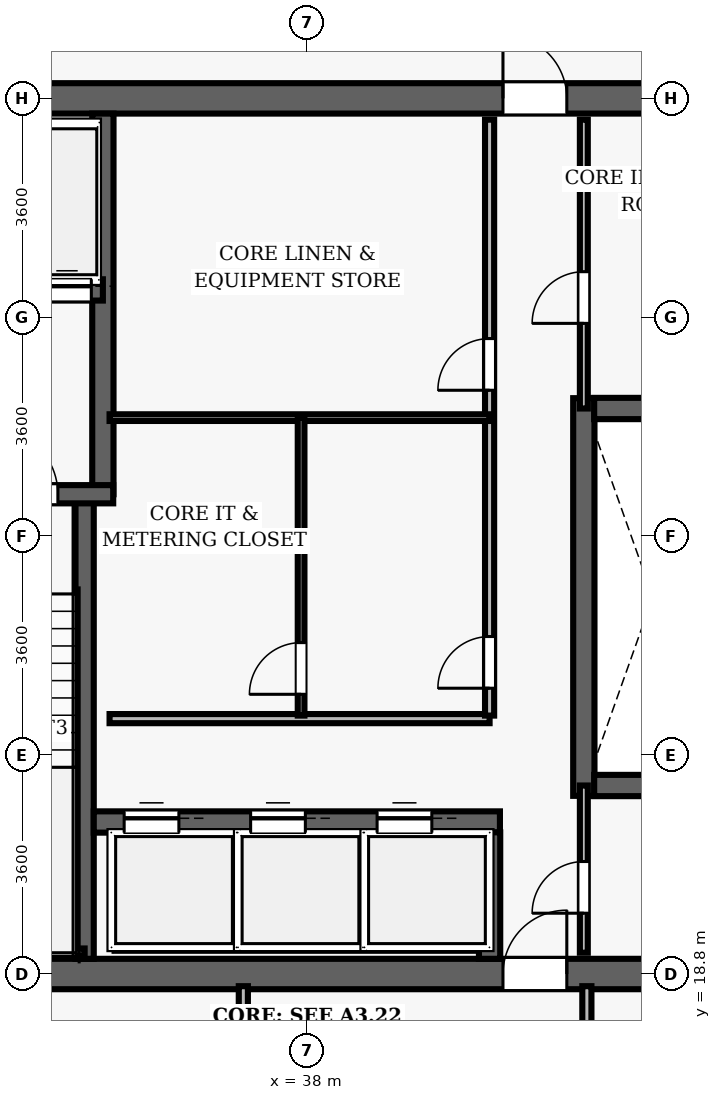
"""IFC4 building model, lengths in metres.
Left out: names, types, materials, properties, quantities, classifications, styles, units other than length and angle.
Written with IfcOpenShell. Run it as: python <this file> out.ifc"""

import sys

from ifc_helpers import new_model, si_unit, direction, frame, frame_2d, origin, place, context, subcontext, project, spatial, rectangle, extrude, element, fill, save


model = new_model("IFC4")
c1 = context("Model", 3, precision=1e-05, world=origin(), true_north=direction((0.0, 1.0)))
c2 = subcontext(c1, "Body", "Model", "MODEL_VIEW")
j1 = project(units=[si_unit("LENGTHUNIT", "METRE"), si_unit("PLANEANGLEUNIT", "RADIAN")], contexts=[c1])
p1 = place(None, origin())
s1 = spatial("IfcSite", under=j1, at=p1, CompositionType="ELEMENT")
p2 = place(p1, origin())
s2 = spatial("IfcBuilding", under=s1, at=p2, CompositionType="ELEMENT")
p3 = place(p2, frame((0.0, 0.0, 194.3)))
s3 = spatial("IfcBuildingStorey", under=s2, at=p3, CompositionType="ELEMENT", Elevation=194.3)
p4 = place(p3, frame((26.75, 18.8, 0.0), z_axis=(0.0, 0.0, 1.0), x_axis=(1.0, 0.0, 0.0)))
e1 = element("IfcWall", 1, at=p4, inside=s3, PredefinedType="SHEAR", context=c2, shape_type="SweptSolid", body=[
    extrude(rectangle(XDim=22.5, YDim=0.5, at=frame_2d((11.25, 0.0))), origin(), (0.0, 0.0, 1.0), 3.85),
])
p5 = place(p4, frame((14.47, 0.0, 0.0)))
e2 = element("IfcOpeningElement", 2, at=p5, cuts=e1, PredefinedType="OPENING", context=c2, shape_type="SweptSolid", body=[
    extrude(rectangle(XDim=1.05, YDim=2.15, at=frame_2d((0.525, 1.075))), frame((0.0, 0.26, 0.0), z_axis=(0.0, -1.0, 0.0), x_axis=(1.0, 0.0, 0.0)), (0.0, 0.0, 1.0), 0.52),
])
p6 = place(p3, frame((26.75, 33.2, 0.0), z_axis=(0.0, 0.0, 1.0), x_axis=(1.0, 0.0, 0.0)))
e3 = element("IfcWall", 3, at=p6, inside=s3, PredefinedType="SHEAR", context=c2, shape_type="SweptSolid", body=[
    extrude(rectangle(XDim=22.5, YDim=0.5, at=frame_2d((11.25, 0.0))), origin(), (0.0, 0.0, 1.0), 3.85),
])
p7 = place(p6, frame((4.57, 0.0, 0.0)))
e4 = element("IfcOpeningElement", 4, at=p7, cuts=e3, PredefinedType="OPENING", context=c2, shape_type="SweptSolid", body=[
    extrude(rectangle(XDim=1.05, YDim=2.15, at=frame_2d((0.525, 1.075))), frame((0.0, 0.26, 0.0), z_axis=(0.0, -1.0, 0.0), x_axis=(1.0, 0.0, 0.0)), (0.0, 0.0, 1.0), 0.52),
])
p8 = place(p6, frame((14.47, 0.0, 0.0)))
e5 = element("IfcOpeningElement", 5, at=p8, cuts=e3, PredefinedType="OPENING", context=c2, shape_type="SweptSolid", body=[
    extrude(rectangle(XDim=1.05, YDim=2.15, at=frame_2d((0.525, 1.075))), frame((0.0, 0.26, 0.0), z_axis=(0.0, -1.0, 0.0), x_axis=(1.0, 0.0, 0.0)), (0.0, 0.0, 1.0), 0.52),
])
p9 = place(p3, frame((34.34, 19.05, 0.0), z_axis=(0.0, 0.0, 1.0), x_axis=(0.0, 1.0, 0.0)))
e6 = element("IfcWall", 6, at=p9, inside=s3, PredefinedType="SHEAR", context=c2, shape_type="SweptSolid", body=[
    extrude(rectangle(XDim=7.5, YDim=0.3, at=frame_2d((3.75, 0.0))), origin(), (0.0, 0.0, 1.0), 3.85),
])
p10 = place(p3, frame((34.64, 26.69, 0.0), z_axis=(0.0, 0.0, 1.0), x_axis=(0.0, 1.0, 0.0)))
e7 = element("IfcWall", 7, at=p10, inside=s3, PredefinedType="SHEAR", context=c2, shape_type="SweptSolid", body=[
    extrude(rectangle(XDim=6.26, YDim=0.35, at=frame_2d((3.13, 0.0))), origin(), (0.0, 0.0, 1.0), 3.85),
])
p11 = place(p3, frame((31.25, 26.69, 0.0), z_axis=(0.0, 0.0, 1.0), x_axis=(1.0, 0.0, 0.0)))
e8 = element("IfcWall", 8, at=p11, inside=s3, PredefinedType="SHEAR", context=c2, shape_type="SweptSolid", body=[
    extrude(rectangle(XDim=3.56, YDim=0.3, at=frame_2d((1.78, 0.0))), origin(), (0.0, 0.0, 1.0), 3.85),
])
p12 = place(p11, frame((1.55, 0.0, 0.0)))
e9 = element("IfcOpeningElement", 9, at=p12, cuts=e8, PredefinedType="OPENING", context=c2, shape_type="SweptSolid", body=[
    extrude(rectangle(XDim=1.1, YDim=2.15, at=frame_2d((0.55, 1.075))), frame((0.0, 0.16, 0.0), z_axis=(0.0, -1.0, 0.0), x_axis=(1.0, 0.0, 0.0)), (0.0, 0.0, 1.0), 0.32),
])
p13 = place(p3, frame((31.3, 19.16, 0.0), z_axis=(0.0, 0.0, 1.0), x_axis=(1.0, 0.0, 0.0)))
e10 = element("IfcWall", 10, at=p13, inside=s3, PredefinedType="SHEAR", context=c2, shape_type="SweptSolid", body=[
    extrude(rectangle(XDim=3.04, YDim=0.12, at=frame_2d((1.52, 0.0))), origin(), (0.0, 0.0, 1.0), 3.85),
])
p14 = place(p3, frame((32.23, 30.05, 0.0), z_axis=(0.0, 0.0, 1.0), x_axis=(1.0, 0.0, 0.0)))
e11 = element("IfcWall", 11, at=p14, inside=s3, PredefinedType="SHEAR", context=c2, shape_type="SweptSolid", body=[
    extrude(rectangle(XDim=2.41, YDim=0.35, at=frame_2d((1.205, 0.0))), origin(), (0.0, 0.0, 1.0), 3.035),
])
p15 = place(p14, frame((0.42, 0.0, 0.0)))
e12 = element("IfcOpeningElement", 12, at=p15, cuts=e11, PredefinedType="OPENING", context=c2, shape_type="SweptSolid", body=[
    extrude(rectangle(XDim=0.8, YDim=2.15, at=frame_2d((0.4, 1.075))), frame((0.0, 0.185, 0.0), z_axis=(0.0, -1.0, 0.0), x_axis=(1.0, 0.0, 0.0)), (0.0, 0.0, 1.0), 0.37),
])
p16 = place(p14, frame((1.42, 0.0, 0.0)))
e13 = element("IfcOpeningElement", 13, at=p16, cuts=e11, PredefinedType="OPENING", context=c2, shape_type="SweptSolid", body=[
    extrude(rectangle(XDim=0.8, YDim=2.15, at=frame_2d((0.4, 1.075))), frame((0.0, 0.185, 0.0), z_axis=(0.0, -1.0, 0.0), x_axis=(1.0, 0.0, 0.0)), (0.0, 0.0, 1.0), 0.37),
])
p17 = place(p3, frame((42.55, 21.73, 0.0), z_axis=(0.0, 0.0, 1.0), x_axis=(0.0, 1.0, 0.0)))
e14 = element("IfcWall", 14, at=p17, inside=s3, PredefinedType="SHEAR", context=c2, shape_type="SweptSolid", body=[
    extrude(rectangle(XDim=6.54, YDim=0.35, at=frame_2d((3.27, 0.0))), origin(), (0.0, 0.0, 1.0), 3.035),
])
for number, where, z_axis, x_axis in (
    (15, (42.72, 21.9, 0.0), (0.0, 0.0, 1.0), (1.0, 0.0, 0.0)),
    (16, (42.72, 28.1, 0.0), (0.0, 0.0, 1.0), (1.0, 0.0, 0.0)),
):
    element("IfcWall", number, at=place(p3, frame(where, z_axis=z_axis, x_axis=x_axis)), inside=s3, PredefinedType="SHEAR", context=c2, shape_type="SweptSolid", body=[
        extrude(rectangle(XDim=2.03, YDim=0.35, at=frame_2d((1.015, 0.0))), origin(), (0.0, 0.0, 1.0), 3.035),
    ])
p18 = place(p3, frame((34.49, 21.3, 0.0), z_axis=(0.0, 0.0, 1.0), x_axis=(1.0, 0.0, 0.0)))
e17 = element("IfcWall", 17, at=p18, inside=s3, PredefinedType="SHEAR", context=c2, shape_type="SweptSolid", body=[
    extrude(rectangle(XDim=6.68, YDim=0.35, at=frame_2d((3.34, 0.0))), origin(), (0.0, 0.0, 1.0), 3.035),
])
p19 = place(p18, frame((0.5, 0.0, 0.0)))
e18 = element("IfcOpeningElement", 18, at=p19, cuts=e17, PredefinedType="OPENING", context=c2, shape_type="SweptSolid", body=[
    extrude(rectangle(XDim=0.9, YDim=2.15, at=frame_2d((0.45, 1.075))), frame((0.0, 0.185, 0.0), z_axis=(0.0, -1.0, 0.0), x_axis=(1.0, 0.0, 0.0)), (0.0, 0.0, 1.0), 0.37),
])
p20 = place(p18, frame((2.58, 0.0, 0.0)))
e19 = element("IfcOpeningElement", 19, at=p20, cuts=e17, PredefinedType="OPENING", context=c2, shape_type="SweptSolid", body=[
    extrude(rectangle(XDim=0.9, YDim=2.15, at=frame_2d((0.45, 1.075))), frame((0.0, 0.185, 0.0), z_axis=(0.0, -1.0, 0.0), x_axis=(1.0, 0.0, 0.0)), (0.0, 0.0, 1.0), 0.37),
])
p21 = place(p18, frame((4.66, 0.0, 0.0)))
e20 = element("IfcOpeningElement", 20, at=p21, cuts=e17, PredefinedType="OPENING", context=c2, shape_type="SweptSolid", body=[
    extrude(rectangle(XDim=0.9, YDim=2.15, at=frame_2d((0.45, 1.075))), frame((0.0, 0.185, 0.0), z_axis=(0.0, -1.0, 0.0), x_axis=(1.0, 0.0, 0.0)), (0.0, 0.0, 1.0), 0.37),
])
p22 = place(p3, frame((41.0, 19.05, 0.0), z_axis=(0.0, 0.0, 1.0), x_axis=(0.0, 1.0, 0.0)))
e21 = element("IfcWall", 21, at=p22, inside=s3, PredefinedType="SHEAR", context=c2, shape_type="SweptSolid", body=[
    extrude(rectangle(XDim=2.08, YDim=0.35, at=frame_2d((1.04, 0.0))), origin(), (0.0, 0.0, 1.0), 3.035),
])
p23 = place(p3, frame((34.75, 23.0, 0.0), z_axis=(0.0, 0.0, 1.0), x_axis=(1.0, 0.0, 0.0)))
e22 = element("IfcWall", 22, at=p23, inside=s3, PredefinedType="PARTITIONING", context=c2, shape_type="SweptSolid", body=[
    extrude(rectangle(XDim=6.25, YDim=0.15, at=frame_2d((3.125, 0.0))), origin(), (0.0, 0.0, 1.0), 3.035),
])
p24 = place(p3, frame((41.0, 23.05, 0.0), z_axis=(0.0, 0.0, 1.0), x_axis=(0.0, 1.0, 0.0)))
e23 = element("IfcWall", 23, at=p24, inside=s3, PredefinedType="PARTITIONING", context=c2, shape_type="SweptSolid", body=[
    extrude(rectangle(XDim=9.8, YDim=0.15, at=frame_2d((4.9, 0.0))), origin(), (0.0, 0.0, 1.0), 3.035),
])
p25 = place(p24, frame((5.35, 0.0, 0.0)))
e24 = element("IfcOpeningElement", 24, at=p25, cuts=e23, PredefinedType="OPENING", context=c2, shape_type="SweptSolid", body=[
    extrude(rectangle(XDim=0.85, YDim=2.1, at=frame_2d((0.425, 1.05))), frame((0.0, 0.085, 0.0), z_axis=(0.0, -1.0, 0.0), x_axis=(1.0, 0.0, 0.0)), (0.0, 0.0, 1.0), 0.17),
])
p26 = place(p24, frame((0.45, 0.0, 0.0)))
e25 = element("IfcOpeningElement", 25, at=p26, cuts=e23, PredefinedType="OPENING", context=c2, shape_type="SweptSolid", body=[
    extrude(rectangle(XDim=0.85, YDim=2.1, at=frame_2d((0.425, 1.05))), frame((0.0, 0.085, 0.0), z_axis=(0.0, -1.0, 0.0), x_axis=(1.0, 0.0, 0.0)), (0.0, 0.0, 1.0), 0.17),
])
p27 = place(p3, frame((34.75, 27.95, 0.0), z_axis=(0.0, 0.0, 1.0), x_axis=(1.0, 0.0, 0.0)))
e26 = element("IfcWall", 26, at=p27, inside=s3, PredefinedType="PARTITIONING", context=c2, shape_type="SweptSolid", body=[
    extrude(rectangle(XDim=6.25, YDim=0.11, at=frame_2d((3.125, 0.0))), origin(), (0.0, 0.0, 1.0), 3.035),
])
p28 = place(p3, frame((37.9, 23.05, 0.0), z_axis=(0.0, 0.0, 1.0), x_axis=(0.0, 1.0, 0.0)))
e27 = element("IfcWall", 27, at=p28, inside=s3, PredefinedType="PARTITIONING", context=c2, shape_type="SweptSolid", body=[
    extrude(rectangle(XDim=4.9, YDim=0.11, at=frame_2d((2.45, 0.0))), origin(), (0.0, 0.0, 1.0), 3.035),
])
p29 = place(p28, frame((0.35, 0.0, 0.0)))
e28 = element("IfcOpeningElement", 28, at=p29, cuts=e27, PredefinedType="OPENING", context=c2, shape_type="SweptSolid", body=[
    extrude(rectangle(XDim=0.85, YDim=2.1, at=frame_2d((0.425, 1.05))), frame((0.0, 0.065, 0.0), z_axis=(0.0, -1.0, 0.0), x_axis=(1.0, 0.0, 0.0)), (0.0, 0.0, 1.0), 0.13),
])
p30 = place(p3, frame((42.55, 28.1, 0.0), z_axis=(0.0, 0.0, 1.0), x_axis=(0.0, 1.0, 0.0)))
e29 = element("IfcWall", 29, at=p30, inside=s3, PredefinedType="PARTITIONING", context=c2, shape_type="SweptSolid", body=[
    extrude(rectangle(XDim=4.75, YDim=0.13, at=frame_2d((2.375, 0.0))), origin(), (0.0, 0.0, 1.0), 3.035),
])
p31 = place(p30, frame((1.4, 0.0, 0.0)))
e30 = element("IfcOpeningElement", 30, at=p31, cuts=e29, PredefinedType="OPENING", context=c2, shape_type="SweptSolid", body=[
    extrude(rectangle(XDim=0.85, YDim=2.1, at=frame_2d((0.425, 1.05))), frame((0.0, 0.075, 0.0), z_axis=(0.0, -1.0, 0.0), x_axis=(1.0, 0.0, 0.0)), (0.0, 0.0, 1.0), 0.15),
])
p32 = place(p3, frame((42.55, 19.15, 0.0), z_axis=(0.0, 0.0, 1.0), x_axis=(0.0, 1.0, 0.0)))
e31 = element("IfcWall", 31, at=p32, inside=s3, PredefinedType="PARTITIONING", context=c2, shape_type="SweptSolid", body=[
    extrude(rectangle(XDim=2.75, YDim=0.13, at=frame_2d((1.375, 0.0))), origin(), (0.0, 0.0, 1.0), 3.035),
])
p33 = place(p32, frame((0.65, 0.0, 0.0)))
e32 = element("IfcOpeningElement", 32, at=p33, cuts=e31, PredefinedType="OPENING", context=c2, shape_type="SweptSolid", body=[
    extrude(rectangle(XDim=0.85, YDim=2.1, at=frame_2d((0.425, 1.05))), frame((0.0, 0.075, 0.0), z_axis=(0.0, -1.0, 0.0), x_axis=(1.0, 0.0, 0.0)), (0.0, 0.0, 1.0), 0.15),
])
p34 = place(p3, frame((36.95, 11.2, 0.0), z_axis=(0.0, 0.0, 1.0), x_axis=(0.0, 1.0, 0.0)))
e33 = element("IfcWall", 33, at=p34, inside=s3, PredefinedType="PARTITIONING", context=c2, shape_type="SweptSolid", body=[
    extrude(rectangle(XDim=7.4, YDim=0.15, at=frame_2d((3.7, 0.0))), origin(), (0.0, 0.0, 1.0), 3.035),
])
p35 = place(p34, frame((5.075, 0.0, 0.0)))
e34 = element("IfcOpeningElement", 34, at=p35, cuts=e33, PredefinedType="OPENING", context=c2, shape_type="SweptSolid", body=[
    extrude(rectangle(XDim=0.95, YDim=2.15, at=frame_2d((0.475, 1.075))), frame((0.0, 0.085, 0.0), z_axis=(0.0, -1.0, 0.0), x_axis=(1.0, 0.0, 0.0)), (0.0, 0.0, 1.0), 0.17),
])
p36 = place(p3, frame((42.6, 16.65, 0.0), z_axis=(0.0, 0.0, 1.0), x_axis=(0.0, 1.0, 0.0)))
e35 = element("IfcWall", 35, at=p36, inside=s3, PredefinedType="PARTITIONING", context=c2, shape_type="SweptSolid", body=[
    extrude(rectangle(XDim=1.95, YDim=0.15, at=frame_2d((0.975, 0.0))), origin(), (0.0, 0.0, 1.0), 3.035),
])
p37 = place(p12, origin())
e36 = element("IfcDoor", 36, at=p37, inside=s3, OperationType="SINGLE_SWING_LEFT", PredefinedType="DOOR", context=c2, shape_type="SweptSolid", body=[
    extrude(rectangle(XDim=1.1, YDim=2.15, at=frame_2d((0.55, 1.075))), frame((0.0, 0.025, 0.0), z_axis=(0.0, -1.0, 0.0), x_axis=(1.0, 0.0, 0.0)), (0.0, 0.0, 1.0), 0.05),
])
fill(e9, e36)
p38 = place(p8, origin())
e37 = element("IfcDoor", 37, at=p38, inside=s3, OperationType="SINGLE_SWING_LEFT", PredefinedType="DOOR", context=c2, shape_type="SweptSolid", body=[
    extrude(rectangle(XDim=1.05, YDim=2.15, at=frame_2d((0.525, 1.075))), frame((0.0, 0.025, 0.0), z_axis=(0.0, -1.0, 0.0), x_axis=(1.0, 0.0, 0.0)), (0.0, 0.0, 1.0), 0.05),
])
fill(e5, e37)
p39 = place(p5, origin())
e38 = element("IfcDoor", 38, at=p39, inside=s3, OperationType="SINGLE_SWING_RIGHT", PredefinedType="DOOR", context=c2, shape_type="SweptSolid", body=[
    extrude(rectangle(XDim=1.05, YDim=2.15, at=frame_2d((0.525, 1.075))), frame((0.0, 0.025, 0.0), z_axis=(0.0, -1.0, 0.0), x_axis=(1.0, 0.0, 0.0)), (0.0, 0.0, 1.0), 0.05),
])
fill(e2, e38)
p40 = place(p25, origin())
e39 = element("IfcDoor", 39, at=p40, inside=s3, OperationType="SINGLE_SWING_LEFT", PredefinedType="DOOR", context=c2, shape_type="SweptSolid", body=[
    extrude(rectangle(XDim=0.85, YDim=2.1, at=frame_2d((0.425, 1.05))), frame((0.0, 0.025, 0.0), z_axis=(0.0, -1.0, 0.0), x_axis=(1.0, 0.0, 0.0)), (0.0, 0.0, 1.0), 0.05),
])
fill(e24, e39)
p41 = place(p26, origin())
e40 = element("IfcDoor", 40, at=p41, inside=s3, OperationType="SINGLE_SWING_LEFT", PredefinedType="DOOR", context=c2, shape_type="SweptSolid", body=[
    extrude(rectangle(XDim=0.85, YDim=2.1, at=frame_2d((0.425, 1.05))), frame((0.0, 0.025, 0.0), z_axis=(0.0, -1.0, 0.0), x_axis=(1.0, 0.0, 0.0)), (0.0, 0.0, 1.0), 0.05),
])
fill(e25, e40)
p42 = place(p29, origin())
e41 = element("IfcDoor", 41, at=p42, inside=s3, OperationType="SINGLE_SWING_LEFT", PredefinedType="DOOR", context=c2, shape_type="SweptSolid", body=[
    extrude(rectangle(XDim=0.85, YDim=2.1, at=frame_2d((0.425, 1.05))), frame((0.0, 0.025, 0.0), z_axis=(0.0, -1.0, 0.0), x_axis=(1.0, 0.0, 0.0)), (0.0, 0.0, 1.0), 0.05),
])
fill(e28, e41)
p43 = place(p31, origin())
e42 = element("IfcDoor", 42, at=p43, inside=s3, OperationType="SINGLE_SWING_LEFT", PredefinedType="DOOR", context=c2, shape_type="SweptSolid", body=[
    extrude(rectangle(XDim=0.85, YDim=2.1, at=frame_2d((0.425, 1.05))), frame((0.0, 0.025, 0.0), z_axis=(0.0, -1.0, 0.0), x_axis=(1.0, 0.0, 0.0)), (0.0, 0.0, 1.0), 0.05),
])
fill(e30, e42)
p44 = place(p33, origin())
e43 = element("IfcDoor", 43, at=p44, inside=s3, OperationType="SINGLE_SWING_LEFT", PredefinedType="DOOR", context=c2, shape_type="SweptSolid", body=[
    extrude(rectangle(XDim=0.85, YDim=2.1, at=frame_2d((0.425, 1.05))), frame((0.0, 0.025, 0.0), z_axis=(0.0, -1.0, 0.0), x_axis=(1.0, 0.0, 0.0)), (0.0, 0.0, 1.0), 0.05),
])
fill(e32, e43)
p45 = place(p19, origin())
e44 = element("IfcDoor", 44, at=p45, inside=s3, OperationType="SLIDING_TO_LEFT", PredefinedType="DOOR", context=c2, shape_type="SweptSolid", body=[
    extrude(rectangle(XDim=0.9, YDim=2.15, at=frame_2d((0.45, 1.075))), frame((0.0, 0.025, 0.0), z_axis=(0.0, -1.0, 0.0), x_axis=(1.0, 0.0, 0.0)), (0.0, 0.0, 1.0), 0.05),
])
fill(e18, e44)
p46 = place(p20, origin())
e45 = element("IfcDoor", 45, at=p46, inside=s3, OperationType="SLIDING_TO_LEFT", PredefinedType="DOOR", context=c2, shape_type="SweptSolid", body=[
    extrude(rectangle(XDim=0.9, YDim=2.15, at=frame_2d((0.45, 1.075))), frame((0.0, 0.025, 0.0), z_axis=(0.0, -1.0, 0.0), x_axis=(1.0, 0.0, 0.0)), (0.0, 0.0, 1.0), 0.05),
])
fill(e19, e45)
p47 = place(p21, origin())
e46 = element("IfcDoor", 46, at=p47, inside=s3, OperationType="SLIDING_TO_LEFT", PredefinedType="DOOR", context=c2, shape_type="SweptSolid", body=[
    extrude(rectangle(XDim=0.9, YDim=2.15, at=frame_2d((0.45, 1.075))), frame((0.0, 0.025, 0.0), z_axis=(0.0, -1.0, 0.0), x_axis=(1.0, 0.0, 0.0)), (0.0, 0.0, 1.0), 0.05),
])
fill(e20, e46)
p48 = place(p16, origin())
e47 = element("IfcDoor", 47, at=p48, inside=s3, OperationType="SLIDING_TO_LEFT", PredefinedType="DOOR", context=c2, shape_type="SweptSolid", body=[
    extrude(rectangle(XDim=0.8, YDim=2.15, at=frame_2d((0.4, 1.075))), frame((0.0, 0.025, 0.0), z_axis=(0.0, -1.0, 0.0), x_axis=(1.0, 0.0, 0.0)), (0.0, 0.0, 1.0), 0.05),
])
fill(e13, e47)
save(model, sys.argv[1])
